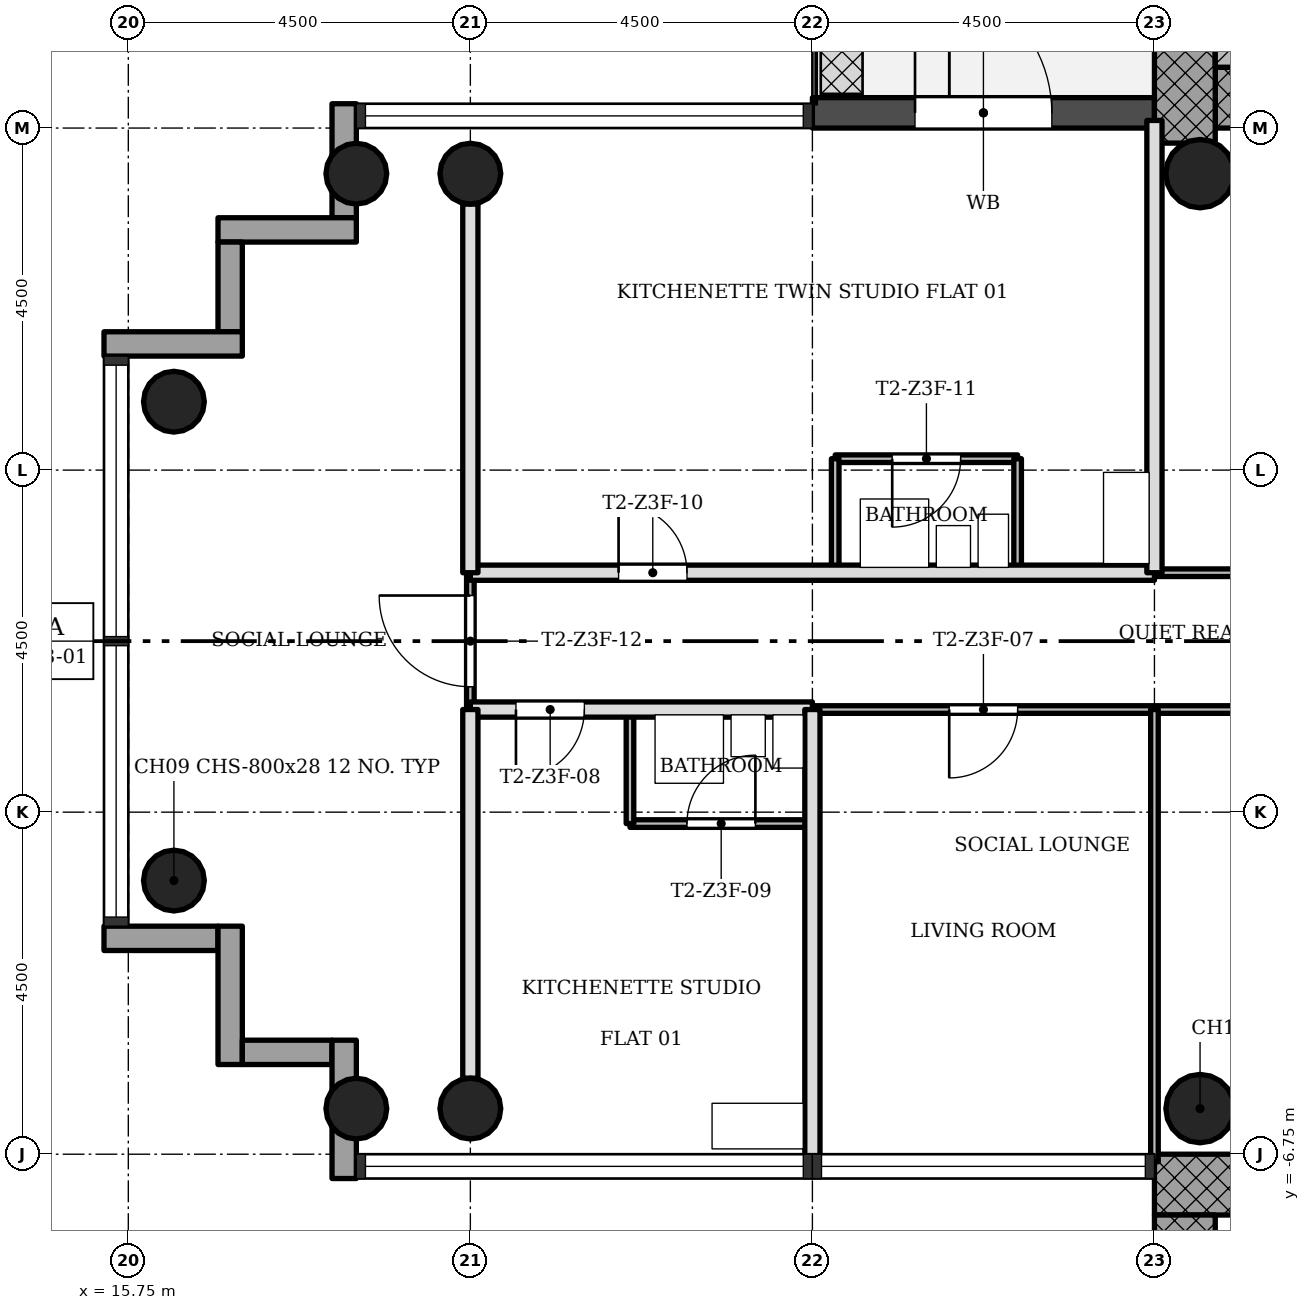
"""IFC4 building model, lengths in metres.
Left out: names, types, materials, properties, quantities, classifications, styles, units other than length and angle.
Written with IfcOpenShell. Run it as: python <this file> out.ifc"""

import sys

from ifc_helpers import new_model, si_unit, direction, frame, frame_2d, origin, origin_2d, place, context, subcontext, project, spatial, rectangle, hollow_circle, extrude, element, fill, save


model = new_model("IFC4")
c1 = context("Model", 3, precision=1e-05, world=origin(), true_north=direction((0.0, 1.0)))
c2 = subcontext(c1, "Body", "Model", "MODEL_VIEW")
j1 = project(units=[si_unit("LENGTHUNIT", "METRE"), si_unit("PLANEANGLEUNIT", "RADIAN")], contexts=[c1])
p1 = place(None, origin())
s1 = spatial("IfcSite", under=j1, at=p1, CompositionType="ELEMENT")
p2 = place(p1, origin())
s2 = spatial("IfcBuilding", under=s1, at=p2, CompositionType="ELEMENT")
p3 = place(p2, frame((0.0, 0.0, 167.7)))
s3 = spatial("IfcBuildingStorey", under=s2, at=p3, CompositionType="ELEMENT", Elevation=167.7)
p4 = place(p3, frame((30.05, 7.15, 0.0), z_axis=(0.0, 0.0, 1.0), x_axis=(1.0, 0.0, 0.0)))
e1 = element("IfcWall", 1, at=p4, inside=s3, PredefinedType="SHEAR", context=c2, shape_type="SweptSolid", body=[
    extrude(rectangle(XDim=12.7, YDim=0.8, at=frame_2d((6.35, 0.0))), origin(), (0.0, 0.0, 1.0), 3.4),
])
p5 = place(p4, frame((5.05, 0.0, 0.0)))
e2 = element("IfcOpeningElement", 2, at=p5, cuts=e1, PredefinedType="OPENING", context=c2, shape_type="SweptSolid", body=[
    extrude(rectangle(XDim=1.8, YDim=2.1, at=frame_2d((0.9, 1.05))), frame((0.0, 0.41, 0.0), z_axis=(0.0, -1.0, 0.0), x_axis=(1.0, 0.0, 0.0)), (0.0, 0.0, 1.0), 0.82),
])
p6 = place(p3, frame((29.65, 15.348, 0.0), z_axis=(0.0, 0.0, 1.0), x_axis=(0.0, -1.0, 0.0)))
e3 = element("IfcWall", 3, at=p6, inside=s3, PredefinedType="SHEAR", context=c2, shape_type="SweptSolid", body=[
    extrude(rectangle(XDim=8.796, YDim=0.8, at=frame_2d((4.398, 0.0))), origin(), (0.0, 0.0, 1.0), 3.4),
])
p7 = place(p3, frame((41.95, -7.15, 0.0), z_axis=(0.0, 0.0, 1.0), x_axis=(-1.0, 0.0, 0.0)))
e4 = element("IfcWall", 4, at=p7, inside=s3, PredefinedType="SHEAR", context=c2, shape_type="SweptSolid", body=[
    extrude(rectangle(XDim=12.7, YDim=0.8, at=frame_2d((6.35, 0.0))), origin(), (0.0, 0.0, 1.0), 3.4),
])
p8 = place(p7, frame((5.05, 0.0, 0.0)))
e5 = element("IfcOpeningElement", 5, at=p8, cuts=e4, PredefinedType="OPENING", context=c2, shape_type="SweptSolid", body=[
    extrude(rectangle(XDim=1.8, YDim=2.1, at=frame_2d((0.9, 1.05))), frame((0.0, 0.41, 0.0), z_axis=(0.0, -1.0, 0.0), x_axis=(1.0, 0.0, 0.0)), (0.0, 0.0, 1.0), 0.82),
])
p9 = place(p3, frame((29.65, -7.55, 0.0), z_axis=(0.0, 0.0, 1.0), x_axis=(0.0, -1.0, 0.0)))
e6 = element("IfcWall", 6, at=p9, inside=s3, PredefinedType="SHEAR", context=c2, shape_type="SweptSolid", body=[
    extrude(rectangle(XDim=8.2, YDim=0.8, at=frame_2d((4.1, 0.0))), origin(), (0.0, 0.0, 1.0), 3.4),
])
for number, where, z_axis, x_axis in (
    (7, (20.25, 6.15, 0.0), (0.0, 0.0, 1.0), (1.0, 0.0, 0.0)),
    (8, (20.25, -6.15, 0.0), (0.0, 0.0, 1.0), (1.0, 0.0, 0.0)),
    (9, (18.75, 6.15, 0.0), (0.0, 0.0, 1.0), (1.0, 0.0, 0.0)),
    (10, (18.75, -6.15, 0.0), (0.0, 0.0, 1.0), (1.0, 0.0, 0.0)),
    (11, (16.35, 3.15, 0.0), (0.0, 0.0, 1.0), (1.0, 0.0, 0.0)),
    (12, (16.35, -3.15, 0.0), (0.0, 0.0, 1.0), (1.0, 0.0, 0.0)),
):
    element("IfcColumn", number, at=place(p3, frame(where, z_axis=z_axis, x_axis=x_axis)), inside=s3, PredefinedType="COLUMN", context=c2, shape_type="SweptSolid", body=[
        extrude(hollow_circle(Radius=0.4, WallThickness=0.028, at=origin_2d()), origin(), (0.0, 0.0, 1.0), 3.4),
    ])
for number, where, z_axis, x_axis in (
    (13, (29.85, 6.15, 0.0), (0.0, 0.0, 1.0), (1.0, 0.0, 0.0)),
    (14, (29.85, -6.15, 0.0), (0.0, 0.0, 1.0), (1.0, 0.0, 0.0)),
):
    element("IfcColumn", number, at=place(p3, frame(where, z_axis=z_axis, x_axis=x_axis)), inside=s3, PredefinedType="COLUMN", context=c2, shape_type="SweptSolid", body=[
        extrude(hollow_circle(Radius=0.45, WallThickness=0.032, at=origin_2d()), origin(), (0.0, 0.0, 1.0), 3.4),
    ])
p10 = place(p3, frame((29.25, 6.95, -0.02), z_axis=(0.0, 0.0, 1.0), x_axis=(-1.0, 0.0, 0.0)))
e15 = element("IfcWall", 15, at=p10, inside=s3, PredefinedType="STANDARD", context=c2, shape_type="SweptSolid", body=[
    extrude(rectangle(XDim=4.5, YDim=0.4, at=frame_2d((2.25, 0.0))), origin(), (0.0, 0.0, 1.0), 3.12),
])
p11 = place(p10, frame((1.35, 0.0, 0.02)))
e16 = element("IfcOpeningElement", 16, at=p11, cuts=e15, PredefinedType="OPENING", context=c2, shape_type="SweptSolid", body=[
    extrude(rectangle(XDim=1.8, YDim=2.1, at=frame_2d((0.9, 1.05))), frame((0.0, 0.21, 0.0), z_axis=(0.0, -1.0, 0.0), x_axis=(1.0, 0.0, 0.0)), (0.0, 0.0, 1.0), 0.42),
])
p12 = place(p3, frame((18.59, 7.07, -0.3), z_axis=(0.0, 0.0, 1.0), x_axis=(0.0, -1.0, 0.0)))
e17 = element("IfcWall", 17, at=p12, inside=s3, PredefinedType="STANDARD", context=c2, shape_type="SweptSolid", body=[
    extrude(rectangle(XDim=1.5, YDim=0.32, at=frame_2d((0.75, 0.0))), origin(), (0.0, 0.0, 1.0), 3.4),
])
p13 = place(p3, frame((18.75, 5.41, -0.3), z_axis=(0.0, 0.0, 1.0), x_axis=(-1.0, 0.0, 0.0)))
e18 = element("IfcWall", 18, at=p13, inside=s3, PredefinedType="STANDARD", context=c2, shape_type="SweptSolid", body=[
    extrude(rectangle(XDim=1.82, YDim=0.32, at=frame_2d((0.91, 0.0))), origin(), (0.0, 0.0, 1.0), 3.4),
])
p14 = place(p3, frame((17.09, 5.25, -0.3), z_axis=(0.0, 0.0, 1.0), x_axis=(0.0, -1.0, 0.0)))
e19 = element("IfcWall", 19, at=p14, inside=s3, PredefinedType="STANDARD", context=c2, shape_type="SweptSolid", body=[
    extrude(rectangle(XDim=1.18, YDim=0.32, at=frame_2d((0.59, 0.0))), origin(), (0.0, 0.0, 1.0), 3.4),
])
p15 = place(p3, frame((17.25, 3.91, -0.3), z_axis=(0.0, 0.0, 1.0), x_axis=(-1.0, 0.0, 0.0)))
e20 = element("IfcWall", 20, at=p15, inside=s3, PredefinedType="STANDARD", context=c2, shape_type="SweptSolid", body=[
    extrude(rectangle(XDim=1.82, YDim=0.32, at=frame_2d((0.91, 0.0))), origin(), (0.0, 0.0, 1.0), 3.4),
])
p16 = place(p3, frame((15.43, -3.91, -0.3), z_axis=(0.0, 0.0, 1.0), x_axis=(1.0, 0.0, 0.0)))
e21 = element("IfcWall", 21, at=p16, inside=s3, PredefinedType="STANDARD", context=c2, shape_type="SweptSolid", body=[
    extrude(rectangle(XDim=1.5, YDim=0.32, at=frame_2d((0.75, 0.0))), origin(), (0.0, 0.0, 1.0), 3.4),
])
p17 = place(p3, frame((17.09, -3.75, -0.3), z_axis=(0.0, 0.0, 1.0), x_axis=(0.0, -1.0, 0.0)))
e22 = element("IfcWall", 22, at=p17, inside=s3, PredefinedType="STANDARD", context=c2, shape_type="SweptSolid", body=[
    extrude(rectangle(XDim=1.82, YDim=0.32, at=frame_2d((0.91, 0.0))), origin(), (0.0, 0.0, 1.0), 3.4),
])
p18 = place(p3, frame((17.25, -5.41, -0.3), z_axis=(0.0, 0.0, 1.0), x_axis=(1.0, 0.0, 0.0)))
e23 = element("IfcWall", 23, at=p18, inside=s3, PredefinedType="STANDARD", context=c2, shape_type="SweptSolid", body=[
    extrude(rectangle(XDim=1.18, YDim=0.32, at=frame_2d((0.59, 0.0))), origin(), (0.0, 0.0, 1.0), 3.4),
])
p19 = place(p3, frame((18.59, -5.25, -0.3), z_axis=(0.0, 0.0, 1.0), x_axis=(0.0, -1.0, 0.0)))
e24 = element("IfcWall", 24, at=p19, inside=s3, PredefinedType="STANDARD", context=c2, shape_type="SweptSolid", body=[
    extrude(rectangle(XDim=1.82, YDim=0.32, at=frame_2d((0.91, 0.0))), origin(), (0.0, 0.0, 1.0), 3.4),
])
p20 = place(p3, frame((24.75, -2.4, 0.0), z_axis=(0.0, 0.0, 1.0), x_axis=(-1.0, 0.0, 0.0)))
e25 = element("IfcWall", 25, at=p20, inside=s3, PredefinedType="PARTITIONING", context=c2, shape_type="SweptSolid", body=[
    extrude(rectangle(XDim=2.4, YDim=0.1, at=frame_2d((1.2, 0.0))), origin(), (0.0, 0.0, 1.0), 3.0),
])
p21 = place(p20, frame((0.75, 0.0, 0.0)))
e26 = element("IfcOpeningElement", 26, at=p21, cuts=e25, PredefinedType="OPENING", context=c2, shape_type="SweptSolid", body=[
    extrude(rectangle(XDim=0.9, YDim=2.1, at=frame_2d((0.45, 1.05))), frame((0.0, 0.06, 0.0), z_axis=(0.0, -1.0, 0.0), x_axis=(1.0, 0.0, 0.0)), (0.0, 0.0, 1.0), 0.12),
])
p22 = place(p3, frame((31.5, -0.9, 0.0), z_axis=(0.0, 0.0, 1.0), x_axis=(-1.0, 0.0, 0.0)))
e27 = element("IfcWall", 27, at=p22, inside=s3, PredefinedType="PARTITIONING", context=c2, shape_type="SweptSolid", body=[
    extrude(rectangle(XDim=6.75, YDim=0.1, at=frame_2d((3.375, 0.0))), origin(), (0.0, 0.0, 1.0), 3.0),
])
p23 = place(p22, frame((4.05, 0.0, 0.0)))
e28 = element("IfcOpeningElement", 28, at=p23, cuts=e27, PredefinedType="OPENING", context=c2, shape_type="SweptSolid", body=[
    extrude(rectangle(XDim=0.9, YDim=2.1, at=frame_2d((0.45, 1.05))), frame((0.0, 0.06, 0.0), z_axis=(0.0, -1.0, 0.0), x_axis=(1.0, 0.0, 0.0)), (0.0, 0.0, 1.0), 0.12),
])
p24 = place(p3, frame((24.75, -0.9, 0.0), z_axis=(0.0, 0.0, 1.0), x_axis=(-1.0, 0.0, 0.0)))
e29 = element("IfcWall", 29, at=p24, inside=s3, PredefinedType="SOLIDWALL", context=c2, shape_type="SweptSolid", body=[
    extrude(rectangle(XDim=4.5, YDim=0.2, at=frame_2d((2.25, 0.0))), origin(), (0.0, 0.0, 1.0), 3.0),
])
p25 = place(p24, frame((3.0, 0.0, 0.0)))
e30 = element("IfcOpeningElement", 30, at=p25, cuts=e29, PredefinedType="OPENING", context=c2, shape_type="SweptSolid", body=[
    extrude(rectangle(XDim=0.9, YDim=2.1, at=frame_2d((0.45, 1.05))), frame((0.0, 0.11, 0.0), z_axis=(0.0, -1.0, 0.0), x_axis=(1.0, 0.0, 0.0)), (0.0, 0.0, 1.0), 0.22),
])
p26 = place(p3, frame((31.5, 0.9, 0.0), z_axis=(0.0, 0.0, 1.0), x_axis=(-1.0, 0.0, 0.0)))
e31 = element("IfcWall", 31, at=p26, inside=s3, PredefinedType="PARTITIONING", context=c2, shape_type="SweptSolid", body=[
    extrude(rectangle(XDim=2.25, YDim=0.1, at=frame_2d((1.125, 0.0))), origin(), (0.0, 0.0, 1.0), 3.0),
])
p27 = place(p3, frame((29.25, 0.9, 0.0), z_axis=(0.0, 0.0, 1.0), x_axis=(-1.0, 0.0, 0.0)))
e32 = element("IfcWall", 32, at=p27, inside=s3, PredefinedType="SOLIDWALL", context=c2, shape_type="SweptSolid", body=[
    extrude(rectangle(XDim=9.0, YDim=0.2, at=frame_2d((4.5, 0.0))), origin(), (0.0, 0.0, 1.0), 3.0),
])
p28 = place(p27, frame((6.15, 0.0, 0.0)))
e33 = element("IfcOpeningElement", 33, at=p28, cuts=e32, PredefinedType="OPENING", context=c2, shape_type="SweptSolid", body=[
    extrude(rectangle(XDim=0.9, YDim=2.1, at=frame_2d((0.45, 1.05))), frame((0.0, 0.11, 0.0), z_axis=(0.0, -1.0, 0.0), x_axis=(1.0, 0.0, 0.0)), (0.0, 0.0, 1.0), 0.22),
])
p29 = place(p3, frame((27.45, 2.4, 0.0), z_axis=(0.0, 0.0, 1.0), x_axis=(-1.0, 0.0, 0.0)))
e34 = element("IfcWall", 34, at=p29, inside=s3, PredefinedType="PARTITIONING", context=c2, shape_type="SweptSolid", body=[
    extrude(rectangle(XDim=2.4, YDim=0.1, at=frame_2d((1.2, 0.0))), origin(), (0.0, 0.0, 1.0), 3.0),
])
p30 = place(p29, frame((0.75, 0.0, 0.0)))
e35 = element("IfcOpeningElement", 35, at=p30, cuts=e34, PredefinedType="OPENING", context=c2, shape_type="SweptSolid", body=[
    extrude(rectangle(XDim=0.9, YDim=2.1, at=frame_2d((0.45, 1.05))), frame((0.0, 0.06, 0.0), z_axis=(0.0, -1.0, 0.0), x_axis=(1.0, 0.0, 0.0)), (0.0, 0.0, 1.0), 0.12),
])
p31 = place(p3, frame((29.25, -6.85, 0.0), z_axis=(0.0, 0.0, 1.0), x_axis=(0.0, 1.0, 0.0)))
e36 = element("IfcWall", 36, at=p31, inside=s3, PredefinedType="PARTITIONING", context=c2, shape_type="SweptSolid", body=[
    extrude(rectangle(XDim=5.95, YDim=0.1, at=frame_2d((2.975, 0.0))), origin(), (0.0, 0.0, 1.0), 3.0),
])
p32 = place(p3, frame((29.25, 0.9, 0.0), z_axis=(0.0, 0.0, 1.0), x_axis=(0.0, 1.0, 0.0)))
e37 = element("IfcWall", 37, at=p32, inside=s3, PredefinedType="SOLIDWALL", context=c2, shape_type="SweptSolid", body=[
    extrude(rectangle(XDim=5.95, YDim=0.2, at=frame_2d((2.975, 0.0))), origin(), (0.0, 0.0, 1.0), 3.0),
])
for number, where, z_axis, x_axis in (
    (38, (27.45, 0.9, 0.0), (0.0, 0.0, 1.0), (0.0, 1.0, 0.0)),
    (39, (25.05, 0.9, 0.0), (0.0, 0.0, 1.0), (0.0, 1.0, 0.0)),
):
    element("IfcWall", number, at=place(p3, frame(where, z_axis=z_axis, x_axis=x_axis)), inside=s3, PredefinedType="PARTITIONING", context=c2, shape_type="SweptSolid", body=[
        extrude(rectangle(XDim=1.5, YDim=0.1, at=frame_2d((0.75, 0.0))), origin(), (0.0, 0.0, 1.0), 3.0),
    ])
p33 = place(p3, frame((24.75, -6.85, 0.0), z_axis=(0.0, 0.0, 1.0), x_axis=(0.0, 1.0, 0.0)))
e40 = element("IfcWall", 40, at=p33, inside=s3, PredefinedType="SOLIDWALL", context=c2, shape_type="SweptSolid", body=[
    extrude(rectangle(XDim=5.95, YDim=0.2, at=frame_2d((2.975, 0.0))), origin(), (0.0, 0.0, 1.0), 3.0),
])
p34 = place(p3, frame((22.35, -2.4, 0.0), z_axis=(0.0, 0.0, 1.0), x_axis=(0.0, 1.0, 0.0)))
e41 = element("IfcWall", 41, at=p34, inside=s3, PredefinedType="PARTITIONING", context=c2, shape_type="SweptSolid", body=[
    extrude(rectangle(XDim=1.5, YDim=0.1, at=frame_2d((0.75, 0.0))), origin(), (0.0, 0.0, 1.0), 3.0),
])
p35 = place(p3, frame((20.25, -0.9, 0.0), z_axis=(0.0, 0.0, 1.0), x_axis=(0.0, 1.0, 0.0)))
e42 = element("IfcWall", 42, at=p35, inside=s3, PredefinedType="PARTITIONING", context=c2, shape_type="SweptSolid", body=[
    extrude(rectangle(XDim=1.8, YDim=0.1, at=frame_2d((0.9, 0.0))), origin(), (0.0, 0.0, 1.0), 3.0),
])
p36 = place(p35, frame((0.3, 0.0, 0.0)))
e43 = element("IfcOpeningElement", 43, at=p36, cuts=e42, PredefinedType="OPENING", context=c2, shape_type="SweptSolid", body=[
    extrude(rectangle(XDim=1.2, YDim=2.1, at=frame_2d((0.6, 1.05))), frame((0.0, 0.06, 0.0), z_axis=(0.0, -1.0, 0.0), x_axis=(1.0, 0.0, 0.0)), (0.0, 0.0, 1.0), 0.12),
])
for number, where, z_axis, x_axis in (
    (44, (20.25, -5.75, 0.0), (0.0, 0.0, 1.0), (0.0, 1.0, 0.0)),
    (45, (20.25, 0.9, 0.0), (0.0, 0.0, 1.0), (0.0, 1.0, 0.0)),
):
    element("IfcWall", number, at=place(p3, frame(where, z_axis=z_axis, x_axis=x_axis)), inside=s3, PredefinedType="SOLIDWALL", context=c2, shape_type="SweptSolid", body=[
        extrude(rectangle(XDim=4.85, YDim=0.2, at=frame_2d((2.425, 0.0))), origin(), (0.0, 0.0, 1.0), 3.0),
    ])
p37 = place(p3, frame((34.15, 7.75, 0.0), z_axis=(0.0, 0.0, 1.0), x_axis=(-1.0, 0.0, 0.0)))
e46 = element("IfcWall", 46, at=p37, inside=s3, PredefinedType="SHEAR", context=c2, shape_type="SweptSolid", body=[
    extrude(rectangle(XDim=4.1, YDim=0.4, at=frame_2d((2.05, 0.0))), origin(), (0.0, 0.0, 1.0), 3.4),
])
p38 = place(p11, origin())
e47 = element("IfcDoor", 47, at=p38, inside=s3, OperationType="SINGLE_SWING_RIGHT", PredefinedType="DOOR", context=c2, shape_type="SweptSolid", body=[
    extrude(rectangle(XDim=1.8, YDim=2.1, at=frame_2d((0.9, 1.05))), frame((0.0, 0.025, 0.0), z_axis=(0.0, -1.0, 0.0), x_axis=(1.0, 0.0, 0.0)), (0.0, 0.0, 1.0), 0.05),
])
fill(e16, e47)
p39 = place(p23, origin())
e48 = element("IfcDoor", 48, at=p39, inside=s3, OperationType="SINGLE_SWING_LEFT", PredefinedType="DOOR", context=c2, shape_type="SweptSolid", body=[
    extrude(rectangle(XDim=0.9, YDim=2.1, at=frame_2d((0.45, 1.05))), frame((0.0, 0.025, 0.0), z_axis=(0.0, -1.0, 0.0), x_axis=(1.0, 0.0, 0.0)), (0.0, 0.0, 1.0), 0.05),
])
fill(e28, e48)
p40 = place(p25, origin())
e49 = element("IfcDoor", 49, at=p40, inside=s3, OperationType="SINGLE_SWING_LEFT", PredefinedType="DOOR", context=c2, shape_type="SweptSolid", body=[
    extrude(rectangle(XDim=0.9, YDim=2.1, at=frame_2d((0.45, 1.05))), frame((0.0, 0.025, 0.0), z_axis=(0.0, -1.0, 0.0), x_axis=(1.0, 0.0, 0.0)), (0.0, 0.0, 1.0), 0.05),
])
fill(e30, e49)
p41 = place(p21, origin())
e50 = element("IfcDoor", 50, at=p41, inside=s3, OperationType="SINGLE_SWING_LEFT", PredefinedType="DOOR", context=c2, shape_type="SweptSolid", body=[
    extrude(rectangle(XDim=0.9, YDim=2.1, at=frame_2d((0.45, 1.05))), frame((0.0, 0.025, 0.0), z_axis=(0.0, -1.0, 0.0), x_axis=(1.0, 0.0, 0.0)), (0.0, 0.0, 1.0), 0.05),
])
fill(e26, e50)
p42 = place(p28, origin())
e51 = element("IfcDoor", 51, at=p42, inside=s3, OperationType="SINGLE_SWING_RIGHT", PredefinedType="DOOR", context=c2, shape_type="SweptSolid", body=[
    extrude(rectangle(XDim=0.9, YDim=2.1, at=frame_2d((0.45, 1.05))), frame((0.0, 0.025, 0.0), z_axis=(0.0, -1.0, 0.0), x_axis=(1.0, 0.0, 0.0)), (0.0, 0.0, 1.0), 0.05),
])
fill(e33, e51)
p43 = place(p30, origin())
e52 = element("IfcDoor", 52, at=p43, inside=s3, OperationType="SINGLE_SWING_LEFT", PredefinedType="DOOR", context=c2, shape_type="SweptSolid", body=[
    extrude(rectangle(XDim=0.9, YDim=2.1, at=frame_2d((0.45, 1.05))), frame((0.0, 0.025, 0.0), z_axis=(0.0, -1.0, 0.0), x_axis=(1.0, 0.0, 0.0)), (0.0, 0.0, 1.0), 0.05),
])
fill(e35, e52)
p44 = place(p36, origin())
e53 = element("IfcDoor", 53, at=p44, inside=s3, OperationType="SINGLE_SWING_LEFT", PredefinedType="DOOR", context=c2, shape_type="SweptSolid", body=[
    extrude(rectangle(XDim=1.2, YDim=2.1, at=frame_2d((0.6, 1.05))), frame((0.0, 0.025, 0.0), z_axis=(0.0, -1.0, 0.0), x_axis=(1.0, 0.0, 0.0)), (0.0, 0.0, 1.0), 0.05),
])
fill(e43, e53)
save(model, sys.argv[1])
